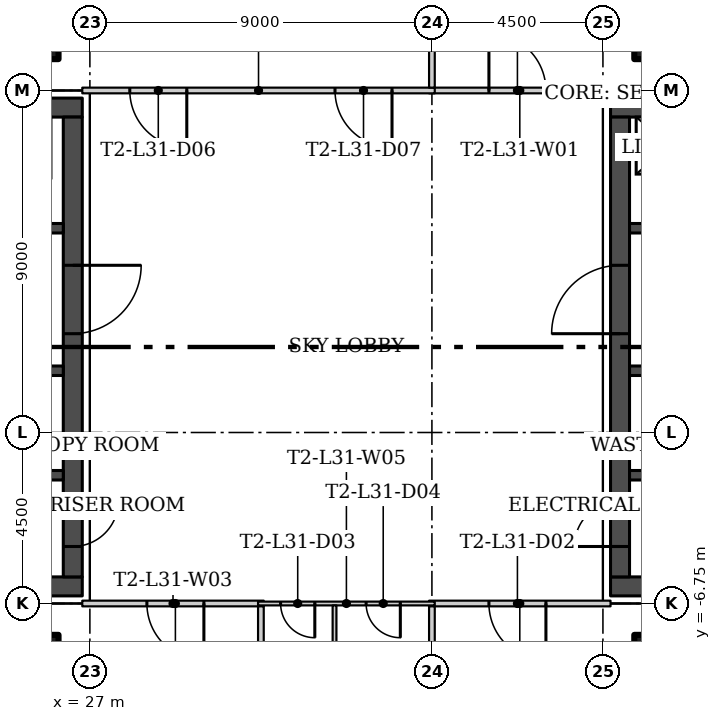
"""IFC4 building model, lengths in metres.
Left out: names, types, materials, properties, quantities, classifications, styles, units other than length and angle.
Written with IfcOpenShell. Run it as: python <this file> out.ifc"""

import sys

from ifc_helpers import new_model, si_unit, direction, frame, frame_2d, origin, origin_2d, place, context, subcontext, project, spatial, rectangle, hollow_rectangle, extrude, element, fill, save


model = new_model("IFC4")
c1 = context("Model", 3, precision=1e-05, world=origin(), true_north=direction((0.0, 1.0)))
c2 = subcontext(c1, "Body", "Model", "MODEL_VIEW")
j1 = project(units=[si_unit("LENGTHUNIT", "METRE"), si_unit("PLANEANGLEUNIT", "RADIAN")], contexts=[c1])
p1 = place(None, origin())
s1 = spatial("IfcSite", under=j1, at=p1, CompositionType="ELEMENT")
p2 = place(p1, origin())
s2 = spatial("IfcBuilding", under=s1, at=p2, CompositionType="ELEMENT")
p3 = place(p2, frame((0.0, 0.0, 133.5)))
s3 = spatial("IfcBuildingStorey", under=s2, at=p3, CompositionType="ELEMENT", Elevation=133.5)
for number, where in (
    (1, (25.625, 8.125, 0.0)),
    (2, (41.875, 8.125, 0.0)),
    (3, (25.625, -8.125, 0.0)),
    (4, (41.875, -8.125, 0.0)),
):
    element("IfcColumn", number, at=place(p3, frame(where)), inside=s3, PredefinedType="COLUMN", context=c2, shape_type="SweptSolid", body=[
        extrude(hollow_rectangle(XDim=1.1, YDim=1.1, WallThickness=0.04, at=origin_2d()), origin(), (0.0, 0.0, 1.0), 5.05),
    ])
p4 = place(p3, frame((35.925, 6.75, 0.0)))
e5 = element("IfcWall", 5, at=p4, inside=s3, PredefinedType="PARTITIONING", context=c2, shape_type="SweptSolid", body=[
    extrude(rectangle(XDim=4.775, YDim=0.15, at=frame_2d((2.387, 0.0))), origin(), (0.0, 0.0, 1.0), 5.05),
])
p5 = place(p4, frame((1.575, 0.0, 0.0)))
e6 = element("IfcOpeningElement", 6, at=p5, cuts=e5, PredefinedType="OPENING", context=c2, shape_type="SweptSolid", body=[
    extrude(rectangle(XDim=1.5, YDim=2.1, at=frame_2d((0.75, 1.05))), frame((0.0, 0.085, 0.0), z_axis=(0.0, -1.0, 0.0), x_axis=(1.0, 0.0, 0.0)), (0.0, 0.0, 1.0), 0.17),
])
p6 = place(p3, frame((36.075, 6.75, 0.0), z_axis=(0.0, 0.0, 1.0), x_axis=(-1.0, 0.0, 0.0)))
e7 = element("IfcWall", 7, at=p6, inside=s3, PredefinedType="PARTITIONING", context=c2, shape_type="SweptSolid", body=[
    extrude(rectangle(XDim=9.275, YDim=0.15, at=frame_2d((4.637, 0.0))), origin(), (0.0, 0.0, 1.0), 5.05),
])
p7 = place(p6, frame((6.525, 0.0, 0.0)))
e8 = element("IfcOpeningElement", 8, at=p7, cuts=e7, PredefinedType="OPENING", context=c2, shape_type="SweptSolid", body=[
    extrude(rectangle(XDim=1.5, YDim=2.1, at=frame_2d((0.75, 1.05))), frame((0.0, 0.085, 0.0), z_axis=(0.0, -1.0, 0.0), x_axis=(1.0, 0.0, 0.0)), (0.0, 0.0, 1.0), 0.17),
])
p8 = place(p6, frame((1.125, 0.0, 0.0)))
e9 = element("IfcOpeningElement", 9, at=p8, cuts=e7, PredefinedType="OPENING", context=c2, shape_type="SweptSolid", body=[
    extrude(rectangle(XDim=1.5, YDim=2.1, at=frame_2d((0.75, 1.05))), frame((0.0, 0.085, 0.0), z_axis=(0.0, -1.0, 0.0), x_axis=(1.0, 0.0, 0.0)), (0.0, 0.0, 1.0), 0.17),
])
p9 = place(p3, frame((31.575, -6.75, 0.0), z_axis=(0.0, 0.0, 1.0), x_axis=(-1.0, 0.0, 0.0)))
e10 = element("IfcWall", 10, at=p9, inside=s3, PredefinedType="PARTITIONING", context=c2, shape_type="SweptSolid", body=[
    extrude(rectangle(XDim=4.775, YDim=0.15, at=frame_2d((2.387, 0.0))), origin(), (0.0, 0.0, 1.0), 5.05),
])
p10 = place(p9, frame((1.575, 0.0, 0.0)))
e11 = element("IfcOpeningElement", 11, at=p10, cuts=e10, PredefinedType="OPENING", context=c2, shape_type="SweptSolid", body=[
    extrude(rectangle(XDim=1.5, YDim=2.1, at=frame_2d((0.75, 1.05))), frame((0.0, 0.085, 0.0), z_axis=(0.0, -1.0, 0.0), x_axis=(1.0, 0.0, 0.0)), (0.0, 0.0, 1.0), 0.17),
])
p11 = place(p3, frame((40.7, -6.75, 0.0), z_axis=(0.0, 0.0, 1.0), x_axis=(-1.0, 0.0, 0.0)))
e12 = element("IfcWall", 12, at=p11, inside=s3, PredefinedType="PARTITIONING", context=c2, shape_type="SweptSolid", body=[
    extrude(rectangle(XDim=4.775, YDim=0.15, at=frame_2d((2.387, 0.0))), origin(), (0.0, 0.0, 1.0), 5.05),
])
p12 = place(p11, frame((1.7, 0.0, 0.0)))
e13 = element("IfcOpeningElement", 13, at=p12, cuts=e12, PredefinedType="OPENING", context=c2, shape_type="SweptSolid", body=[
    extrude(rectangle(XDim=1.5, YDim=2.1, at=frame_2d((0.75, 1.05))), frame((0.0, 0.085, 0.0), z_axis=(0.0, -1.0, 0.0), x_axis=(1.0, 0.0, 0.0)), (0.0, 0.0, 1.0), 0.17),
])
p13 = place(p3, frame((36.075, -6.75, 0.0), z_axis=(0.0, 0.0, 1.0), x_axis=(-1.0, 0.0, 0.0)))
e14 = element("IfcWall", 14, at=p13, inside=s3, PredefinedType="PARTITIONING", context=c2, shape_type="SweptSolid", body=[
    extrude(rectangle(XDim=4.65, YDim=0.1, at=frame_2d((2.325, 0.0))), origin(), (0.0, 0.0, 1.0), 5.05),
])
p14 = place(p13, frame((3.156, 0.0, 0.0)))
e15 = element("IfcOpeningElement", 15, at=p14, cuts=e14, PredefinedType="OPENING", context=c2, shape_type="SweptSolid", body=[
    extrude(rectangle(XDim=0.9, YDim=2.1, at=frame_2d((0.45, 1.05))), frame((0.0, 0.06, 0.0), z_axis=(0.0, -1.0, 0.0), x_axis=(1.0, 0.0, 0.0)), (0.0, 0.0, 1.0), 0.12),
])
p15 = place(p13, frame((0.906, 0.0, 0.0)))
e16 = element("IfcOpeningElement", 16, at=p15, cuts=e14, PredefinedType="OPENING", context=c2, shape_type="SweptSolid", body=[
    extrude(rectangle(XDim=0.9, YDim=2.1, at=frame_2d((0.45, 1.05))), frame((0.0, 0.06, 0.0), z_axis=(0.0, -1.0, 0.0), x_axis=(1.0, 0.0, 0.0)), (0.0, 0.0, 1.0), 0.12),
])
for number, where, z_axis, x_axis in (
    (17, (36.0, -6.825, 0.0), (0.0, 0.0, 1.0), (0.0, -1.0, 0.0)),
    (18, (36.0, 20.155, 0.0), (0.0, 0.0, 1.0), (0.0, -1.0, 0.0)),
):
    element("IfcWall", number, at=place(p3, frame(where, z_axis=z_axis, x_axis=x_axis)), inside=s3, PredefinedType="PARTITIONING", context=c2, shape_type="SweptSolid", body=[
        extrude(rectangle(XDim=13.33, YDim=0.15, at=frame_2d((6.665, 0.0))), origin(), (0.0, 0.0, 1.0), 5.05),
    ])
p16 = place(p3, frame((33.438, -6.8, 0.0), z_axis=(0.0, 0.0, 1.0), x_axis=(0.0, -1.0, 0.0)))
e19 = element("IfcWall", 19, at=p16, inside=s3, PredefinedType="PARTITIONING", context=c2, shape_type="SweptSolid", body=[
    extrude(rectangle(XDim=13.355, YDim=0.1, at=frame_2d((6.677, 0.0))), origin(), (0.0, 0.0, 1.0), 5.05),
])
p17 = place(p3, frame((31.5, -6.825, 0.0), z_axis=(0.0, 0.0, 1.0), x_axis=(0.0, -1.0, 0.0)))
e20 = element("IfcWall", 20, at=p17, inside=s3, PredefinedType="PARTITIONING", context=c2, shape_type="SweptSolid", body=[
    extrude(rectangle(XDim=13.33, YDim=0.15, at=frame_2d((6.665, 0.0))), origin(), (0.0, 0.0, 1.0), 5.05),
])
for number, where in (
    (21, (13.7, -6.3, 0.0)),
    (22, (13.7, 6.3, 0.0)),
):
    element("IfcWall", number, at=place(p3, frame(where)), inside=s3, PredefinedType="SHEAR", context=c2, shape_type="SweptSolid", body=[
        extrude(rectangle(XDim=13.1, YDim=0.5, at=frame_2d((6.55, 0.0))), origin(), (0.0, 0.0, 1.0), 5.05),
    ])
p18 = place(p3, frame((26.55, 6.05, 0.0), z_axis=(0.0, 0.0, 1.0), x_axis=(0.0, -1.0, 0.0)))
e23 = element("IfcWall", 23, at=p18, inside=s3, PredefinedType="SHEAR", context=c2, shape_type="SweptSolid", body=[
    extrude(rectangle(XDim=12.1, YDim=0.5, at=frame_2d((6.05, 0.0))), origin(), (0.0, 0.0, 1.0), 5.05),
])
p19 = place(p18, frame((10.1, 0.0, 0.0)))
e24 = element("IfcOpeningElement", 24, at=p19, cuts=e23, PredefinedType="OPENING", context=c2, shape_type="SweptSolid", body=[
    extrude(rectangle(XDim=1.2, YDim=2.1, at=frame_2d((0.6, 1.05))), frame((0.0, 0.26, 0.0), z_axis=(0.0, -1.0, 0.0), x_axis=(1.0, 0.0, 0.0)), (0.0, 0.0, 1.0), 0.52),
])
p20 = place(p18, frame((3.9, 0.0, 0.0)))
e25 = element("IfcOpeningElement", 25, at=p20, cuts=e23, PredefinedType="OPENING", context=c2, shape_type="SweptSolid", body=[
    extrude(rectangle(XDim=1.8, YDim=2.4, at=frame_2d((0.9, 1.2))), frame((0.0, 0.26, 0.0), z_axis=(0.0, -1.0, 0.0), x_axis=(1.0, 0.0, 0.0)), (0.0, 0.0, 1.0), 0.52),
])
p21 = place(p3, frame((26.3, -3.375, 0.0), z_axis=(0.0, 0.0, 1.0), x_axis=(-1.0, 0.0, 0.0)))
e26 = element("IfcWall", 26, at=p21, inside=s3, PredefinedType="SHEAR", context=c2, shape_type="SweptSolid", body=[
    extrude(rectangle(XDim=12.1, YDim=0.25, at=frame_2d((6.05, 0.0))), origin(), (0.0, 0.0, 1.0), 5.05),
])
p22 = place(p21, frame((10.95, 0.0, 0.0)))
e27 = element("IfcOpeningElement", 27, at=p22, cuts=e26, PredefinedType="OPENING", context=c2, shape_type="SweptSolid", body=[
    extrude(rectangle(XDim=1.1, YDim=2.1, at=frame_2d((0.55, 1.05))), frame((0.0, 0.135, 0.0), z_axis=(0.0, -1.0, 0.0), x_axis=(1.0, 0.0, 0.0)), (0.0, 0.0, 1.0), 0.27),
])
p23 = place(p3, frame((26.3, -0.625, 0.0), z_axis=(0.0, 0.0, 1.0), x_axis=(-1.0, 0.0, 0.0)))
e28 = element("IfcWall", 28, at=p23, inside=s3, PredefinedType="SHEAR", context=c2, shape_type="SweptSolid", body=[
    extrude(rectangle(XDim=12.1, YDim=0.25, at=frame_2d((6.05, 0.0))), origin(), (0.0, 0.0, 1.0), 5.05),
])
p24 = place(p23, frame((8.65, 0.0, 0.0)))
e29 = element("IfcOpeningElement", 29, at=p24, cuts=e28, PredefinedType="OPENING", context=c2, shape_type="SweptSolid", body=[
    extrude(rectangle(XDim=1.2, YDim=2.1, at=frame_2d((0.6, 1.05))), frame((0.0, 0.135, 0.0), z_axis=(0.0, -1.0, 0.0), x_axis=(1.0, 0.0, 0.0)), (0.0, 0.0, 1.0), 0.27),
])
p25 = place(p23, frame((2.0, 0.0, 0.0)))
e30 = element("IfcOpeningElement", 30, at=p25, cuts=e28, PredefinedType="OPENING", context=c2, shape_type="SweptSolid", body=[
    extrude(rectangle(XDim=0.9, YDim=2.1, at=frame_2d((0.45, 1.05))), frame((0.0, 0.135, 0.0), z_axis=(0.0, -1.0, 0.0), x_axis=(1.0, 0.0, 0.0)), (0.0, 0.0, 1.0), 0.27),
])
p26 = place(p23, frame((0.375, 0.0, 0.0)))
e31 = element("IfcOpeningElement", 31, at=p26, cuts=e28, PredefinedType="OPENING", context=c2, shape_type="SweptSolid", body=[
    extrude(rectangle(XDim=0.9, YDim=2.1, at=frame_2d((0.45, 1.05))), frame((0.0, 0.135, 0.0), z_axis=(0.0, -1.0, 0.0), x_axis=(1.0, 0.0, 0.0)), (0.0, 0.0, 1.0), 0.27),
])
p27 = place(p3, frame((14.2, 3.125, 0.0)))
e32 = element("IfcWall", 32, at=p27, inside=s3, PredefinedType="SHEAR", context=c2, shape_type="SweptSolid", body=[
    extrude(rectangle(XDim=12.1, YDim=0.25, at=frame_2d((6.05, 0.0))), origin(), (0.0, 0.0, 1.0), 5.05),
])
p28 = place(p27, frame((6.95, 0.0, 0.0)))
e33 = element("IfcOpeningElement", 33, at=p28, cuts=e32, PredefinedType="OPENING", context=c2, shape_type="SweptSolid", body=[
    extrude(rectangle(XDim=1.1, YDim=2.1, at=frame_2d((0.55, 1.05))), frame((0.0, 0.135, 0.0), z_axis=(0.0, -1.0, 0.0), x_axis=(1.0, 0.0, 0.0)), (0.0, 0.0, 1.0), 0.27),
])
p29 = place(p27, frame((10.075, 0.0, 0.0)))
e34 = element("IfcOpeningElement", 34, at=p29, cuts=e32, PredefinedType="OPENING", context=c2, shape_type="SweptSolid", body=[
    extrude(rectangle(XDim=1.1, YDim=2.1, at=frame_2d((0.55, 1.05))), frame((0.0, 0.135, 0.0), z_axis=(0.0, -1.0, 0.0), x_axis=(1.0, 0.0, 0.0)), (0.0, 0.0, 1.0), 0.27),
])
for number, where, z_axis, x_axis in (
    (35, (53.8, -6.3, 0.0), (0.0, 0.0, 1.0), (-1.0, 0.0, 0.0)),
    (36, (53.8, 6.3, 0.0), (0.0, 0.0, 1.0), (-1.0, 0.0, 0.0)),
):
    element("IfcWall", number, at=place(p3, frame(where, z_axis=z_axis, x_axis=x_axis)), inside=s3, PredefinedType="SHEAR", context=c2, shape_type="SweptSolid", body=[
        extrude(rectangle(XDim=13.1, YDim=0.5, at=frame_2d((6.55, 0.0))), origin(), (0.0, 0.0, 1.0), 5.05),
    ])
p30 = place(p3, frame((40.95, -6.05, 0.0), z_axis=(0.0, 0.0, 1.0), x_axis=(0.0, 1.0, 0.0)))
e37 = element("IfcWall", 37, at=p30, inside=s3, PredefinedType="SHEAR", context=c2, shape_type="SweptSolid", body=[
    extrude(rectangle(XDim=12.1, YDim=0.5, at=frame_2d((6.05, 0.0))), origin(), (0.0, 0.0, 1.0), 5.05),
])
p31 = place(p30, frame((0.8, 0.0, 0.0)))
e38 = element("IfcOpeningElement", 38, at=p31, cuts=e37, PredefinedType="OPENING", context=c2, shape_type="SweptSolid", body=[
    extrude(rectangle(XDim=1.2, YDim=2.1, at=frame_2d((0.6, 1.05))), frame((0.0, 0.26, 0.0), z_axis=(0.0, -1.0, 0.0), x_axis=(1.0, 0.0, 0.0)), (0.0, 0.0, 1.0), 0.52),
])
p32 = place(p30, frame((6.4, 0.0, 0.0)))
e39 = element("IfcOpeningElement", 39, at=p32, cuts=e37, PredefinedType="OPENING", context=c2, shape_type="SweptSolid", body=[
    extrude(rectangle(XDim=1.8, YDim=2.4, at=frame_2d((0.9, 1.2))), frame((0.0, 0.26, 0.0), z_axis=(0.0, -1.0, 0.0), x_axis=(1.0, 0.0, 0.0)), (0.0, 0.0, 1.0), 0.52),
])
p33 = place(p3, frame((53.3, -3.375, 0.0), z_axis=(0.0, 0.0, 1.0), x_axis=(-1.0, 0.0, 0.0)))
e40 = element("IfcWall", 40, at=p33, inside=s3, PredefinedType="SHEAR", context=c2, shape_type="SweptSolid", body=[
    extrude(rectangle(XDim=12.1, YDim=0.25, at=frame_2d((6.05, 0.0))), origin(), (0.0, 0.0, 1.0), 5.05),
])
p34 = place(p33, frame((0.05, 0.0, 0.0)))
e41 = element("IfcOpeningElement", 41, at=p34, cuts=e40, PredefinedType="OPENING", context=c2, shape_type="SweptSolid", body=[
    extrude(rectangle(XDim=1.1, YDim=2.1, at=frame_2d((0.55, 1.05))), frame((0.0, 0.135, 0.0), z_axis=(0.0, -1.0, 0.0), x_axis=(1.0, 0.0, 0.0)), (0.0, 0.0, 1.0), 0.27),
])
p35 = place(p3, frame((53.3, -0.625, 0.0), z_axis=(0.0, 0.0, 1.0), x_axis=(-1.0, 0.0, 0.0)))
e42 = element("IfcWall", 42, at=p35, inside=s3, PredefinedType="SHEAR", context=c2, shape_type="SweptSolid", body=[
    extrude(rectangle(XDim=12.1, YDim=0.25, at=frame_2d((6.05, 0.0))), origin(), (0.0, 0.0, 1.0), 5.05),
])
p36 = place(p35, frame((2.25, 0.0, 0.0)))
e43 = element("IfcOpeningElement", 43, at=p36, cuts=e42, PredefinedType="OPENING", context=c2, shape_type="SweptSolid", body=[
    extrude(rectangle(XDim=1.2, YDim=2.1, at=frame_2d((0.6, 1.05))), frame((0.0, 0.135, 0.0), z_axis=(0.0, -1.0, 0.0), x_axis=(1.0, 0.0, 0.0)), (0.0, 0.0, 1.0), 0.27),
])
p37 = place(p35, frame((9.05, 0.0, 0.0)))
e44 = element("IfcOpeningElement", 44, at=p37, cuts=e42, PredefinedType="OPENING", context=c2, shape_type="SweptSolid", body=[
    extrude(rectangle(XDim=0.9, YDim=2.1, at=frame_2d((0.45, 1.05))), frame((0.0, 0.135, 0.0), z_axis=(0.0, -1.0, 0.0), x_axis=(1.0, 0.0, 0.0)), (0.0, 0.0, 1.0), 0.27),
])
p38 = place(p35, frame((10.675, 0.0, 0.0)))
e45 = element("IfcOpeningElement", 45, at=p38, cuts=e42, PredefinedType="OPENING", context=c2, shape_type="SweptSolid", body=[
    extrude(rectangle(XDim=0.9, YDim=2.1, at=frame_2d((0.45, 1.05))), frame((0.0, 0.135, 0.0), z_axis=(0.0, -1.0, 0.0), x_axis=(1.0, 0.0, 0.0)), (0.0, 0.0, 1.0), 0.27),
])
p39 = place(p3, frame((46.0, 3.125, 0.0), z_axis=(0.0, 0.0, 1.0), x_axis=(-1.0, 0.0, 0.0)))
e46 = element("IfcWall", 46, at=p39, inside=s3, PredefinedType="SHEAR", context=c2, shape_type="SweptSolid", body=[
    extrude(rectangle(XDim=4.8, YDim=0.25, at=frame_2d((2.4, 0.0))), origin(), (0.0, 0.0, 1.0), 5.05),
])
p40 = place(p39, frame((3.175, 0.0, 0.0)))
e47 = element("IfcOpeningElement", 47, at=p40, cuts=e46, PredefinedType="OPENING", context=c2, shape_type="SweptSolid", body=[
    extrude(rectangle(XDim=1.1, YDim=2.1, at=frame_2d((0.55, 1.05))), frame((0.0, 0.135, 0.0), z_axis=(0.0, -1.0, 0.0), x_axis=(1.0, 0.0, 0.0)), (0.0, 0.0, 1.0), 0.27),
])
p41 = place(p5, origin())
e48 = element("IfcDoor", 48, at=p41, inside=s3, OperationType="DOUBLE_DOOR_SINGLE_SWING", PredefinedType="DOOR", context=c2, shape_type="SweptSolid", body=[
    extrude(rectangle(XDim=1.5, YDim=2.1, at=frame_2d((0.75, 1.05))), frame((0.0, 0.025, 0.0), z_axis=(0.0, -1.0, 0.0), x_axis=(1.0, 0.0, 0.0)), (0.0, 0.0, 1.0), 0.05),
])
fill(e6, e48)
p42 = place(p12, origin())
e49 = element("IfcDoor", 49, at=p42, inside=s3, OperationType="DOUBLE_DOOR_SINGLE_SWING", PredefinedType="DOOR", context=c2, shape_type="SweptSolid", body=[
    extrude(rectangle(XDim=1.5, YDim=2.1, at=frame_2d((0.75, 1.05))), frame((0.0, 0.025, 0.0), z_axis=(0.0, -1.0, 0.0), x_axis=(1.0, 0.0, 0.0)), (0.0, 0.0, 1.0), 0.05),
])
fill(e13, e49)
p43 = place(p14, origin())
e50 = element("IfcDoor", 50, at=p43, inside=s3, OperationType="SINGLE_SWING_RIGHT", PredefinedType="DOOR", context=c2, shape_type="SweptSolid", body=[
    extrude(rectangle(XDim=0.9, YDim=2.1, at=frame_2d((0.45, 1.05))), frame((0.0, 0.025, 0.0), z_axis=(0.0, -1.0, 0.0), x_axis=(1.0, 0.0, 0.0)), (0.0, 0.0, 1.0), 0.05),
])
fill(e15, e50)
p44 = place(p15, origin())
e51 = element("IfcDoor", 51, at=p44, inside=s3, OperationType="SINGLE_SWING_RIGHT", PredefinedType="DOOR", context=c2, shape_type="SweptSolid", body=[
    extrude(rectangle(XDim=0.9, YDim=2.1, at=frame_2d((0.45, 1.05))), frame((0.0, 0.025, 0.0), z_axis=(0.0, -1.0, 0.0), x_axis=(1.0, 0.0, 0.0)), (0.0, 0.0, 1.0), 0.05),
])
fill(e16, e51)
p45 = place(p10, origin())
e52 = element("IfcDoor", 52, at=p45, inside=s3, OperationType="DOUBLE_DOOR_SINGLE_SWING", PredefinedType="DOOR", context=c2, shape_type="SweptSolid", body=[
    extrude(rectangle(XDim=1.5, YDim=2.1, at=frame_2d((0.75, 1.05))), frame((0.0, 0.025, 0.0), z_axis=(0.0, -1.0, 0.0), x_axis=(1.0, 0.0, 0.0)), (0.0, 0.0, 1.0), 0.05),
])
fill(e11, e52)
p46 = place(p7, origin())
e53 = element("IfcDoor", 53, at=p46, inside=s3, OperationType="DOUBLE_DOOR_SINGLE_SWING", PredefinedType="DOOR", context=c2, shape_type="SweptSolid", body=[
    extrude(rectangle(XDim=1.5, YDim=2.1, at=frame_2d((0.75, 1.05))), frame((0.0, 0.025, 0.0), z_axis=(0.0, -1.0, 0.0), x_axis=(1.0, 0.0, 0.0)), (0.0, 0.0, 1.0), 0.05),
])
fill(e8, e53)
p47 = place(p8, origin())
e54 = element("IfcDoor", 54, at=p47, inside=s3, OperationType="DOUBLE_DOOR_SINGLE_SWING", PredefinedType="DOOR", context=c2, shape_type="SweptSolid", body=[
    extrude(rectangle(XDim=1.5, YDim=2.1, at=frame_2d((0.75, 1.05))), frame((0.0, 0.025, 0.0), z_axis=(0.0, -1.0, 0.0), x_axis=(1.0, 0.0, 0.0)), (0.0, 0.0, 1.0), 0.05),
])
fill(e9, e54)
p48 = place(p19, origin())
e55 = element("IfcDoor", 55, at=p48, inside=s3, OperationType="SINGLE_SWING_RIGHT", PredefinedType="DOOR", context=c2, shape_type="SweptSolid", body=[
    extrude(rectangle(XDim=1.2, YDim=2.1, at=frame_2d((0.6, 1.05))), frame((0.0, 0.025, 0.0), z_axis=(0.0, -1.0, 0.0), x_axis=(1.0, 0.0, 0.0)), (0.0, 0.0, 1.0), 0.05),
])
fill(e24, e55)
p49 = place(p20, origin())
e56 = element("IfcDoor", 56, at=p49, inside=s3, OperationType="DOUBLE_DOOR_SINGLE_SWING", PredefinedType="DOOR", context=c2, shape_type="SweptSolid", body=[
    extrude(rectangle(XDim=1.8, YDim=2.4, at=frame_2d((0.9, 1.2))), frame((0.0, 0.025, 0.0), z_axis=(0.0, -1.0, 0.0), x_axis=(1.0, 0.0, 0.0)), (0.0, 0.0, 1.0), 0.05),
])
fill(e25, e56)
p50 = place(p31, origin())
e57 = element("IfcDoor", 57, at=p50, inside=s3, OperationType="SINGLE_SWING_LEFT", PredefinedType="DOOR", context=c2, shape_type="SweptSolid", body=[
    extrude(rectangle(XDim=1.2, YDim=2.1, at=frame_2d((0.6, 1.05))), frame((0.0, 0.025, 0.0), z_axis=(0.0, -1.0, 0.0), x_axis=(1.0, 0.0, 0.0)), (0.0, 0.0, 1.0), 0.05),
])
fill(e38, e57)
p51 = place(p32, origin())
e58 = element("IfcDoor", 58, at=p51, inside=s3, OperationType="DOUBLE_DOOR_SINGLE_SWING", PredefinedType="DOOR", context=c2, shape_type="SweptSolid", body=[
    extrude(rectangle(XDim=1.8, YDim=2.4, at=frame_2d((0.9, 1.2))), frame((0.0, 0.025, 0.0), z_axis=(0.0, -1.0, 0.0), x_axis=(1.0, 0.0, 0.0)), (0.0, 0.0, 1.0), 0.05),
])
fill(e39, e58)
save(model, sys.argv[1])
